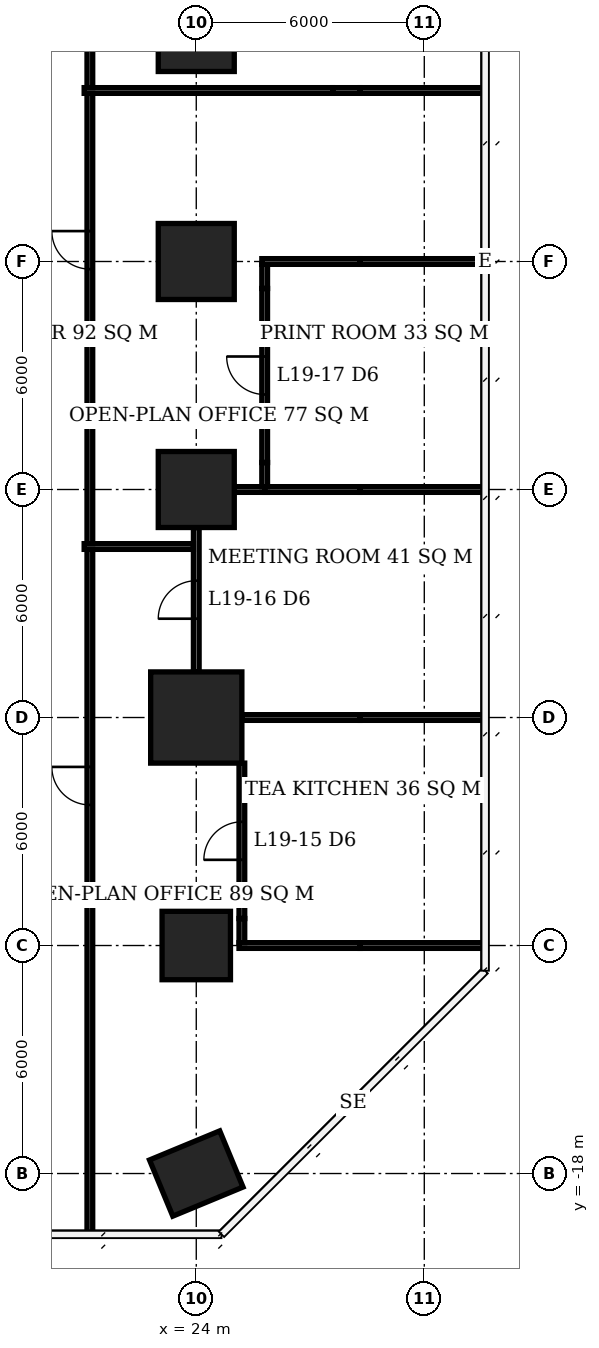
"""IFC4 building model, lengths in metres.
Left out: names, types, materials, properties, quantities, classifications, styles, units other than length and angle.
Written with IfcOpenShell. Run it as: python <this file> out.ifc"""

import sys

from ifc_helpers import new_model, si_unit, direction, frame, frame_2d, origin, origin_2d, place, context, subcontext, project, spatial, rectangle, extrude, element, fill, save


model = new_model("IFC4")
c1 = context("Model", 3, precision=1e-05, world=origin(), true_north=direction((0.0, 1.0)))
c2 = subcontext(c1, "Body", "Model", "MODEL_VIEW")
j1 = project(units=[si_unit("LENGTHUNIT", "METRE"), si_unit("PLANEANGLEUNIT", "RADIAN")], contexts=[c1])
p1 = place(None, origin())
s1 = spatial("IfcSite", under=j1, at=p1, CompositionType="ELEMENT")
p2 = place(p1, origin())
s2 = spatial("IfcBuilding", under=s1, at=p2, CompositionType="ELEMENT")
p3 = place(p2, frame((0.0, 0.0, 80.6)))
s3 = spatial("IfcBuildingStorey", under=s2, at=p3, CompositionType="ELEMENT", Elevation=80.6)
p4 = place(p3, frame((24.0, -18.0, 0.0), z_axis=(0.0, 0.0, 1.0), x_axis=(-0.923879532511, -0.382683432365, 0.0)))
e1 = element("IfcColumn", 1, at=p4, inside=s3, PredefinedType="COLUMN", context=c2, shape_type="SweptSolid", body=[
    extrude(rectangle(XDim=2.0, YDim=1.6, at=origin_2d()), origin(), (0.0, 0.0, 1.0), 3.9),
])
p5 = place(p3, frame((24.0, -12.0, 0.0), z_axis=(0.0, 0.0, 1.0), x_axis=(1.0, 0.0, 0.0)))
e2 = element("IfcColumn", 2, at=p5, inside=s3, PredefinedType="COLUMN", context=c2, shape_type="SweptSolid", body=[
    extrude(rectangle(XDim=1.8, YDim=1.8, at=origin_2d()), origin(), (0.0, 0.0, 1.0), 3.9),
])
p6 = place(p3, frame((24.0, -6.0, 0.0), z_axis=(0.0, 0.0, 1.0), x_axis=(1.0, 0.0, 0.0)))
e3 = element("IfcColumn", 3, at=p6, inside=s3, PredefinedType="COLUMN", context=c2, shape_type="SweptSolid", body=[
    extrude(rectangle(XDim=2.4, YDim=2.4, at=origin_2d()), origin(), (0.0, 0.0, 1.0), 3.9),
])
for number, where, z_axis, x_axis in (
    (4, (24.0, 0.0, 0.0), (0.0, 0.0, 1.0), (1.0, 0.0, 0.0)),
    (5, (24.0, 6.0, 0.0), (0.0, 0.0, 1.0), (1.0, 0.0, 0.0)),
    (6, (24.0, 12.0, 0.0), (0.0, 0.0, 1.0), (1.0, 0.0, 0.0)),
):
    element("IfcColumn", number, at=place(p3, frame(where, z_axis=z_axis, x_axis=x_axis)), inside=s3, PredefinedType="COLUMN", context=c2, shape_type="SweptSolid", body=[
        extrude(rectangle(XDim=2.0, YDim=2.0, at=origin_2d()), origin(), (0.0, 0.0, 1.0), 3.9),
    ])
p7 = place(p3, frame((25.125, -12.0, 0.0), z_axis=(0.0, 0.0, 1.0), x_axis=(1.0, 0.0, 0.0)))
e7 = element("IfcWall", 7, at=p7, inside=s3, PredefinedType="PARTITIONING", context=c2, shape_type="SweptSolid", body=[
    extrude(rectangle(XDim=3.185, YDim=0.15, at=frame_2d((1.593, 0.0))), origin(), (0.0, 0.0, 1.0), 2.65),
])
p8 = place(p3, frame((28.31, -12.0, 0.0), z_axis=(0.0, 0.0, 1.0), x_axis=(1.0, 0.0, 0.0)))
e8 = element("IfcWall", 8, at=p8, inside=s3, PredefinedType="PARTITIONING", context=c2, shape_type="SweptSolid", body=[
    extrude(rectangle(XDim=3.29, YDim=0.15, at=frame_2d((1.645, 0.0))), origin(), (0.0, 0.0, 1.0), 3.65),
])
p9 = place(p3, frame((25.2, -6.0, 0.0), z_axis=(0.0, 0.0, 1.0), x_axis=(1.0, 0.0, 0.0)))
e9 = element("IfcWall", 9, at=p9, inside=s3, PredefinedType="PARTITIONING", context=c2, shape_type="SweptSolid", body=[
    extrude(rectangle(XDim=3.11, YDim=0.15, at=frame_2d((1.555, 0.0))), origin(), (0.0, 0.0, 1.0), 2.65),
])
p10 = place(p3, frame((28.31, -6.0, 0.0), z_axis=(0.0, 0.0, 1.0), x_axis=(1.0, 0.0, 0.0)))
e10 = element("IfcWall", 10, at=p10, inside=s3, PredefinedType="PARTITIONING", context=c2, shape_type="SweptSolid", body=[
    extrude(rectangle(XDim=3.29, YDim=0.15, at=frame_2d((1.645, 0.0))), origin(), (0.0, 0.0, 1.0), 3.65),
])
p11 = place(p3, frame((25.0, 0.0, 0.0), z_axis=(0.0, 0.0, 1.0), x_axis=(1.0, 0.0, 0.0)))
e11 = element("IfcWall", 11, at=p11, inside=s3, PredefinedType="PARTITIONING", context=c2, shape_type="SweptSolid", body=[
    extrude(rectangle(XDim=0.875, YDim=0.15, at=frame_2d((0.438, 0.0))), origin(), (0.0, 0.0, 1.0), 2.65),
])
p12 = place(p3, frame((25.8, 0.0, 0.0), z_axis=(0.0, 0.0, 1.0), x_axis=(1.0, 0.0, 0.0)))
e12 = element("IfcWall", 12, at=p12, inside=s3, PredefinedType="PARTITIONING", context=c2, shape_type="SweptSolid", body=[
    extrude(rectangle(XDim=2.51, YDim=0.15, at=frame_2d((1.255, 0.0))), origin(), (0.0, 0.0, 1.0), 2.65),
])
p13 = place(p3, frame((28.31, 0.0, 0.0), z_axis=(0.0, 0.0, 1.0), x_axis=(1.0, 0.0, 0.0)))
e13 = element("IfcWall", 13, at=p13, inside=s3, PredefinedType="PARTITIONING", context=c2, shape_type="SweptSolid", body=[
    extrude(rectangle(XDim=3.29, YDim=0.15, at=frame_2d((1.645, 0.0))), origin(), (0.0, 0.0, 1.0), 3.65),
])
p14 = place(p3, frame((25.725, 6.0, 0.0), z_axis=(0.0, 0.0, 1.0), x_axis=(1.0, 0.0, 0.0)))
e14 = element("IfcWall", 14, at=p14, inside=s3, PredefinedType="PARTITIONING", context=c2, shape_type="SweptSolid", body=[
    extrude(rectangle(XDim=2.585, YDim=0.15, at=frame_2d((1.292, 0.0))), origin(), (0.0, 0.0, 1.0), 2.65),
])
p15 = place(p3, frame((28.31, 6.0, 0.0), z_axis=(0.0, 0.0, 1.0), x_axis=(1.0, 0.0, 0.0)))
e15 = element("IfcWall", 15, at=p15, inside=s3, PredefinedType="PARTITIONING", context=c2, shape_type="SweptSolid", body=[
    extrude(rectangle(XDim=3.24, YDim=0.15, at=frame_2d((1.62, 0.0))), origin(), (0.0, 0.0, 1.0), 3.65),
])
p16 = place(p3, frame((24.0, -4.8, 0.0), z_axis=(0.0, 0.0, 1.0), x_axis=(0.0, 1.0, 0.0)))
e16 = element("IfcWall", 16, at=p16, inside=s3, PredefinedType="PARTITIONING", context=c2, shape_type="SweptSolid", body=[
    extrude(rectangle(XDim=3.8, YDim=0.15, at=frame_2d((1.9, 0.0))), origin(), (0.0, 0.0, 1.0), 3.65),
])
p17 = place(p16, frame((1.4, 0.0, 0.0)))
e17 = element("IfcOpeningElement", 17, at=p17, cuts=e16, PredefinedType="OPENING", context=c2, shape_type="SweptSolid", body=[
    extrude(rectangle(XDim=1.0, YDim=2.1, at=frame_2d((0.5, 1.05))), frame((0.0, 0.085, 0.0), z_axis=(0.0, -1.0, 0.0), x_axis=(1.0, 0.0, 0.0)), (0.0, 0.0, 1.0), 0.17),
])
p18 = place(p3, frame((25.2, -11.925, 0.0), z_axis=(0.0, 0.0, 1.0), x_axis=(0.0, 1.0, 0.0)))
e18 = element("IfcWall", 18, at=p18, inside=s3, PredefinedType="PARTITIONING", context=c2, shape_type="SweptSolid", body=[
    extrude(rectangle(XDim=0.635, YDim=0.15, at=frame_2d((0.317, 0.0))), origin(), (0.0, 0.0, 1.0), 2.65),
])
p19 = place(p3, frame((25.2, -11.29, 0.0), z_axis=(0.0, 0.0, 1.0), x_axis=(0.0, 1.0, 0.0)))
e19 = element("IfcWall", 19, at=p19, inside=s3, PredefinedType="PARTITIONING", context=c2, shape_type="SweptSolid", body=[
    extrude(rectangle(XDim=4.09, YDim=0.15, at=frame_2d((2.045, 0.0))), origin(), (0.0, 0.0, 1.0), 3.65),
])
p20 = place(p19, frame((1.545, 0.0, 0.0)))
e20 = element("IfcOpeningElement", 20, at=p20, cuts=e19, PredefinedType="OPENING", context=c2, shape_type="SweptSolid", body=[
    extrude(rectangle(XDim=1.0, YDim=2.1, at=frame_2d((0.5, 1.05))), frame((0.0, 0.085, 0.0), z_axis=(0.0, -1.0, 0.0), x_axis=(1.0, 0.0, 0.0)), (0.0, 0.0, 1.0), 0.17),
])
p21 = place(p3, frame((25.8, 0.075, 0.0), z_axis=(0.0, 0.0, 1.0), x_axis=(0.0, 1.0, 0.0)))
e21 = element("IfcWall", 21, at=p21, inside=s3, PredefinedType="PARTITIONING", context=c2, shape_type="SweptSolid", body=[
    extrude(rectangle(XDim=0.635, YDim=0.15, at=frame_2d((0.317, 0.0))), origin(), (0.0, 0.0, 1.0), 2.65),
])
p22 = place(p3, frame((25.8, 0.71, 0.0), z_axis=(0.0, 0.0, 1.0), x_axis=(0.0, 1.0, 0.0)))
e22 = element("IfcWall", 22, at=p22, inside=s3, PredefinedType="PARTITIONING", context=c2, shape_type="SweptSolid", body=[
    extrude(rectangle(XDim=4.58, YDim=0.15, at=frame_2d((2.29, 0.0))), origin(), (0.0, 0.0, 1.0), 3.65),
])
p23 = place(p22, frame((1.79, 0.0, 0.0)))
e23 = element("IfcOpeningElement", 23, at=p23, cuts=e22, PredefinedType="OPENING", context=c2, shape_type="SweptSolid", body=[
    extrude(rectangle(XDim=1.0, YDim=2.1, at=frame_2d((0.5, 1.05))), frame((0.0, 0.085, 0.0), z_axis=(0.0, -1.0, 0.0), x_axis=(1.0, 0.0, 0.0)), (0.0, 0.0, 1.0), 0.17),
])
p24 = place(p3, frame((25.8, 5.29, 0.0), z_axis=(0.0, 0.0, 1.0), x_axis=(0.0, 1.0, 0.0)))
e24 = element("IfcWall", 24, at=p24, inside=s3, PredefinedType="PARTITIONING", context=c2, shape_type="SweptSolid", body=[
    extrude(rectangle(XDim=0.635, YDim=0.15, at=frame_2d((0.317, 0.0))), origin(), (0.0, 0.0, 1.0), 2.65),
])
p25 = place(p3, frame((21.2, -19.6, 0.0), z_axis=(0.0, 0.0, 1.0), x_axis=(0.0, 1.0, 0.0)))
e25 = element("IfcWall", 25, at=p25, inside=s3, PredefinedType="PARTITIONING", context=c2, shape_type="SweptSolid", body=[
    extrude(rectangle(XDim=18.025, YDim=0.15, at=frame_2d((9.013, 0.0))), origin(), (0.0, 0.0, 1.0), 3.65),
])
p26 = place(p25, frame((11.3, 0.0, 0.0)))
e26 = element("IfcOpeningElement", 26, at=p26, cuts=e25, PredefinedType="OPENING", context=c2, shape_type="SweptSolid", body=[
    extrude(rectangle(XDim=1.0, YDim=2.1, at=frame_2d((0.5, 1.05))), frame((0.0, 0.085, 0.0), z_axis=(0.0, -1.0, 0.0), x_axis=(1.0, 0.0, 0.0)), (0.0, 0.0, 1.0), 0.17),
])
p27 = place(p3, frame((21.2, -1.425, 0.0), z_axis=(0.0, 0.0, 1.0), x_axis=(0.0, 1.0, 0.0)))
e27 = element("IfcWall", 27, at=p27, inside=s3, PredefinedType="PARTITIONING", context=c2, shape_type="SweptSolid", body=[
    extrude(rectangle(XDim=11.85, YDim=0.15, at=frame_2d((5.925, 0.0))), origin(), (0.0, 0.0, 1.0), 3.65),
])
p28 = place(p27, frame((7.225, 0.0, 0.0)))
e28 = element("IfcOpeningElement", 28, at=p28, cuts=e27, PredefinedType="OPENING", context=c2, shape_type="SweptSolid", body=[
    extrude(rectangle(XDim=1.0, YDim=2.1, at=frame_2d((0.5, 1.05))), frame((0.0, 0.085, 0.0), z_axis=(0.0, -1.0, 0.0), x_axis=(1.0, 0.0, 0.0)), (0.0, 0.0, 1.0), 0.17),
])
p29 = place(p3, frame((21.05, -1.5, 0.0), z_axis=(0.0, 0.0, 1.0), x_axis=(1.0, 0.0, 0.0)))
e29 = element("IfcWall", 29, at=p29, inside=s3, PredefinedType="PARTITIONING", context=c2, shape_type="SweptSolid", body=[
    extrude(rectangle(XDim=2.875, YDim=0.15, at=frame_2d((1.438, 0.0))), origin(), (0.0, 0.0, 1.0), 3.65),
])
p30 = place(p3, frame((21.2, 10.575, 0.0), z_axis=(0.0, 0.0, 1.0), x_axis=(0.0, 1.0, 0.0)))
e30 = element("IfcWall", 30, at=p30, inside=s3, PredefinedType="PARTITIONING", context=c2, shape_type="SweptSolid", body=[
    extrude(rectangle(XDim=14.833, YDim=0.15, at=frame_2d((7.417, 0.0))), origin(), (0.0, 0.0, 1.0), 3.65),
])
p31 = place(p30, frame((13.075, 0.0, 0.0)))
e31 = element("IfcOpeningElement", 31, at=p31, cuts=e30, PredefinedType="OPENING", context=c2, shape_type="SweptSolid", body=[
    extrude(rectangle(XDim=1.0, YDim=2.1, at=frame_2d((0.5, 1.05))), frame((0.0, 0.085, 0.0), z_axis=(0.0, -1.0, 0.0), x_axis=(1.0, 0.0, 0.0)), (0.0, 0.0, 1.0), 0.17),
])
p32 = place(p3, frame((21.05, 10.5, 0.0), z_axis=(0.0, 0.0, 1.0), x_axis=(1.0, 0.0, 0.0)))
e32 = element("IfcWall", 32, at=p32, inside=s3, PredefinedType="PARTITIONING", context=c2, shape_type="SweptSolid", body=[
    extrude(rectangle(XDim=6.54, YDim=0.15, at=frame_2d((3.27, 0.0))), origin(), (0.0, 0.0, 1.0), 3.65),
])
p33 = place(p3, frame((27.59, 10.5, 0.0), z_axis=(0.0, 0.0, 1.0), x_axis=(1.0, 0.0, 0.0)))
e33 = element("IfcWall", 33, at=p33, inside=s3, PredefinedType="PARTITIONING", context=c2, shape_type="SweptSolid", body=[
    extrude(rectangle(XDim=0.72, YDim=0.15, at=frame_2d((0.36, 0.0))), origin(), (0.0, 0.0, 1.0), 2.65),
])
p34 = place(p3, frame((28.31, 10.5, 0.0), z_axis=(0.0, 0.0, 1.0), x_axis=(1.0, 0.0, 0.0)))
e34 = element("IfcWall", 34, at=p34, inside=s3, PredefinedType="PARTITIONING", context=c2, shape_type="SweptSolid", body=[
    extrude(rectangle(XDim=3.29, YDim=0.15, at=frame_2d((1.645, 0.0))), origin(), (0.0, 0.0, 1.0), 3.65),
])
p35 = place(p20, origin())
e35 = element("IfcDoor", 35, at=p35, inside=s3, OperationType="SINGLE_SWING_LEFT", PredefinedType="DOOR", context=c2, shape_type="SweptSolid", body=[
    extrude(rectangle(XDim=1.0, YDim=2.1, at=frame_2d((0.5, 1.05))), frame((0.0, 0.025, 0.0), z_axis=(0.0, -1.0, 0.0), x_axis=(1.0, 0.0, 0.0)), (0.0, 0.0, 1.0), 0.05),
])
fill(e20, e35)
p36 = place(p17, origin())
e36 = element("IfcDoor", 36, at=p36, inside=s3, OperationType="SINGLE_SWING_LEFT", PredefinedType="DOOR", context=c2, shape_type="SweptSolid", body=[
    extrude(rectangle(XDim=1.0, YDim=2.1, at=frame_2d((0.5, 1.05))), frame((0.0, 0.025, 0.0), z_axis=(0.0, -1.0, 0.0), x_axis=(1.0, 0.0, 0.0)), (0.0, 0.0, 1.0), 0.05),
])
fill(e17, e36)
p37 = place(p23, origin())
e37 = element("IfcDoor", 37, at=p37, inside=s3, OperationType="SINGLE_SWING_RIGHT", PredefinedType="DOOR", context=c2, shape_type="SweptSolid", body=[
    extrude(rectangle(XDim=1.0, YDim=2.1, at=frame_2d((0.5, 1.05))), frame((0.0, 0.025, 0.0), z_axis=(0.0, -1.0, 0.0), x_axis=(1.0, 0.0, 0.0)), (0.0, 0.0, 1.0), 0.05),
])
fill(e23, e37)
p38 = place(p26, origin())
e38 = element("IfcDoor", 38, at=p38, inside=s3, OperationType="SINGLE_SWING_RIGHT", PredefinedType="DOOR", context=c2, shape_type="SweptSolid", body=[
    extrude(rectangle(XDim=1.0, YDim=2.1, at=frame_2d((0.5, 1.05))), frame((0.0, 0.025, 0.0), z_axis=(0.0, -1.0, 0.0), x_axis=(1.0, 0.0, 0.0)), (0.0, 0.0, 1.0), 0.05),
])
fill(e26, e38)
p39 = place(p28, origin())
e39 = element("IfcDoor", 39, at=p39, inside=s3, OperationType="SINGLE_SWING_RIGHT", PredefinedType="DOOR", context=c2, shape_type="SweptSolid", body=[
    extrude(rectangle(XDim=1.0, YDim=2.1, at=frame_2d((0.5, 1.05))), frame((0.0, 0.025, 0.0), z_axis=(0.0, -1.0, 0.0), x_axis=(1.0, 0.0, 0.0)), (0.0, 0.0, 1.0), 0.05),
])
fill(e28, e39)
save(model, sys.argv[1])
